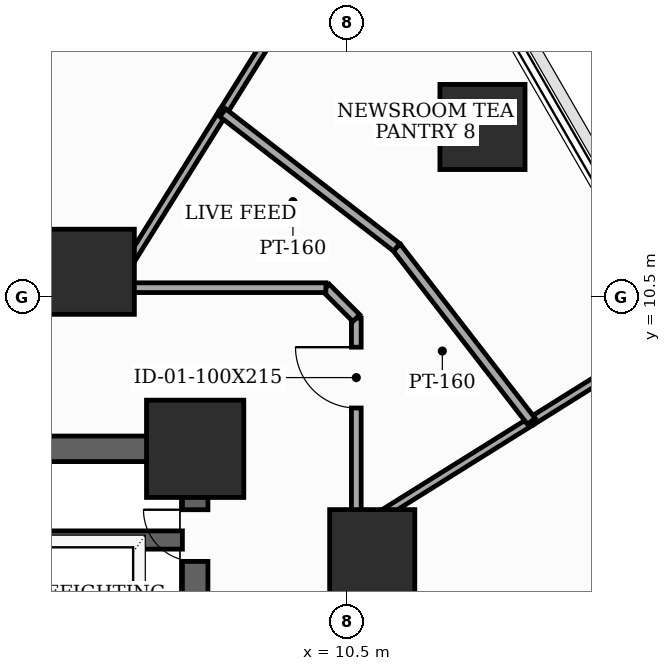
"""IFC4 building model, lengths in metres.
Left out: names, types, materials, properties, quantities, classifications, styles, units other than length and angle.
Written with IfcOpenShell. Run it as: python <this file> out.ifc"""

import sys

from ifc_helpers import new_model, si_unit, direction, frame, frame_2d, origin, origin_2d, place, context, subcontext, project, spatial, rectangle, extrude, element, fill, save


model = new_model("IFC4")
c1 = context("Model", 3, precision=1e-05, world=origin(), true_north=direction((0.0, 1.0)))
c2 = subcontext(c1, "Body", "Model", "MODEL_VIEW")
j1 = project(units=[si_unit("LENGTHUNIT", "METRE"), si_unit("PLANEANGLEUNIT", "RADIAN")], contexts=[c1])
p1 = place(None, origin())
s1 = spatial("IfcSite", under=j1, at=p1, CompositionType="ELEMENT")
p2 = place(p1, origin())
s2 = spatial("IfcBuilding", under=s1, at=p2, CompositionType="ELEMENT")
p3 = place(p2, frame((0.0, 0.0, 33.4)))
s3 = spatial("IfcBuildingStorey", under=s2, at=p3, CompositionType="ELEMENT", Elevation=33.4)
p4 = place(p3, frame((8.0, 8.0, 0.0), z_axis=(0.0, 0.0, 1.0), x_axis=(1.0, 0.0, 0.0)))
e1 = element("IfcColumn", 1, at=p4, inside=s3, PredefinedType="COLUMN", context=c2, shape_type="SweptSolid", body=[
    extrude(rectangle(XDim=1.6, YDim=1.6, at=origin_2d()), origin(), (0.0, 0.0, 1.0), 3.7),
])
for number, where, z_axis, x_axis in (
    (2, (10.912, 6.3, 0.0), (0.0, 0.0, 1.0), (1.0, 0.0, 0.0)),
    (3, (6.3, 10.912, 0.0), (0.0, 0.0, 1.0), (1.0, 0.0, 0.0)),
    (4, (12.725, 13.293, 0.0), (0.0, 0.0, 1.0), (1.0, 0.0, 0.0)),
):
    element("IfcColumn", number, at=place(p3, frame(where, z_axis=z_axis, x_axis=x_axis)), inside=s3, PredefinedType="COLUMN", context=c2, shape_type="SweptSolid", body=[
        extrude(rectangle(XDim=1.4, YDim=1.4, at=origin_2d()), origin(), (0.0, 0.0, 1.0), 3.7),
    ])
p5 = place(p3, frame((8.0, -8.0, 0.0), z_axis=(0.0, 0.0, 1.0), x_axis=(0.0, 1.0, 0.0)))
e5 = element("IfcWall", 5, at=p5, inside=s3, PredefinedType="SHEAR", context=c2, shape_type="SweptSolid", body=[
    extrude(rectangle(XDim=16.0, YDim=0.42, at=frame_2d((8.0, 0.0))), origin(), (0.0, 0.0, 1.0), 3.5),
])
p6 = place(p5, frame((9.6, 0.0, 0.0)))
e6 = element("IfcOpeningElement", 6, at=p6, cuts=e5, PredefinedType="OPENING", context=c2, shape_type="SweptSolid", body=[
    extrude(rectangle(XDim=1.05, YDim=2.15, at=frame_2d((0.525, 1.075))), frame((0.0, 0.22, 0.0), z_axis=(0.0, -1.0, 0.0), x_axis=(1.0, 0.0, 0.0)), (0.0, 0.0, 1.0), 0.44),
])
p7 = place(p5, frame((14.148, 0.0, 0.0)))
e7 = element("IfcOpeningElement", 7, at=p7, cuts=e5, PredefinedType="OPENING", context=c2, shape_type="SweptSolid", body=[
    extrude(rectangle(XDim=0.85, YDim=2.02, at=frame_2d((0.425, 1.01))), frame((0.0, 0.22, 0.0), z_axis=(0.0, -1.0, 0.0), x_axis=(1.0, 0.0, 0.0)), (0.0, 0.0, 1.0), 0.44),
])
p8 = place(p3, frame((-8.0, 8.0, 0.0), z_axis=(0.0, 0.0, 1.0), x_axis=(1.0, 0.0, 0.0)))
e8 = element("IfcWall", 8, at=p8, inside=s3, PredefinedType="SHEAR", context=c2, shape_type="SweptSolid", body=[
    extrude(rectangle(XDim=16.0, YDim=0.42, at=frame_2d((8.0, 0.0))), origin(), (0.0, 0.0, 1.0), 3.5),
])
p9 = place(p8, frame((7.1, 0.0, 0.0)))
e9 = element("IfcOpeningElement", 9, at=p9, cuts=e8, PredefinedType="OPENING", context=c2, shape_type="SweptSolid", body=[
    extrude(rectangle(XDim=1.8, YDim=2.15, at=frame_2d((0.9, 1.075))), frame((0.0, 0.22, 0.0), z_axis=(0.0, -1.0, 0.0), x_axis=(1.0, 0.0, 0.0)), (0.0, 0.0, 1.0), 0.44),
])
p10 = place(p3, frame((4.45, 6.5, 0.0), z_axis=(0.0, 0.0, 1.0), x_axis=(1.0, 0.0, 0.0)))
e10 = element("IfcWall", 10, at=p10, inside=s3, PredefinedType="SHEAR", context=c2, shape_type="SweptSolid", body=[
    extrude(rectangle(XDim=3.34, YDim=0.3, at=frame_2d((1.67, 0.0))), origin(), (0.0, 0.0, 1.0), 3.5),
])
p11 = place(p3, frame((10.65, -1.715, 0.0), z_axis=(0.0, 0.0, 1.0), x_axis=(0.0, 1.0, 0.0)))
e11 = element("IfcWall", 11, at=p11, inside=s3, PredefinedType="PARTITIONING", context=c2, shape_type="SweptSolid", body=[
    extrude(rectangle(XDim=8.37, YDim=0.135, at=frame_2d((4.185, 0.0))), origin(), (0.0, 0.0, 1.0), 2.785),
])
p12 = place(p3, frame((6.655, 10.65, 0.0), z_axis=(0.0, 0.0, 1.0), x_axis=(-1.0, 0.0, 0.0)))
e12 = element("IfcWall", 12, at=p12, inside=s3, PredefinedType="PARTITIONING", context=c2, shape_type="SweptSolid", body=[
    extrude(rectangle(XDim=2.663, YDim=0.135, at=frame_2d((1.332, 0.0))), origin(), (0.0, 0.0, 1.0), 2.685),
])
p13 = place(p3, frame((3.992, 10.65, 0.0), z_axis=(0.0, 0.0, 1.0), x_axis=(0.258889712088, 0.965906888357, 0.0)))
e13 = element("IfcWall", 13, at=p13, inside=s3, PredefinedType="PARTITIONING", context=c2, shape_type="SweptSolid", body=[
    extrude(rectangle(XDim=11.28, YDim=0.135, at=frame_2d((5.64, 0.0))), origin(), (0.0, 0.0, 1.0), 2.785),
])
p14 = place(p3, frame((10.65, 6.655, 0.0), z_axis=(0.0, 0.0, 1.0), x_axis=(0.0, 1.0, 0.0)))
e14 = element("IfcWall", 14, at=p14, inside=s3, PredefinedType="PARTITIONING", context=c2, shape_type="SweptSolid", body=[
    extrude(rectangle(XDim=3.495, YDim=0.16, at=frame_2d((1.748, 0.0))), origin(), (0.0, 0.0, 1.0), 2.785),
])
p15 = place(p14, frame((2.016, 0.0, 0.0)))
e15 = element("IfcOpeningElement", 15, at=p15, cuts=e14, PredefinedType="OPENING", context=c2, shape_type="SweptSolid", body=[
    extrude(rectangle(XDim=1.0, YDim=2.15, at=frame_2d((0.5, 1.075))), frame((0.0, 0.09, 0.0), z_axis=(0.0, -1.0, 0.0), x_axis=(1.0, 0.0, 0.0)), (0.0, 0.0, 1.0), 0.18),
])
p16 = place(p3, frame((10.65, 10.15, 0.0), z_axis=(0.0, 0.0, 1.0), x_axis=(-0.707106781187, 0.707106781187, 0.0)))
e16 = element("IfcWall", 16, at=p16, inside=s3, PredefinedType="PARTITIONING", context=c2, shape_type="SweptSolid", body=[
    extrude(rectangle(XDim=0.707, YDim=0.16, at=frame_2d((0.354, 0.0))), origin(), (0.0, 0.0, 1.0), 3.5),
])
p17 = place(p3, frame((10.15, 10.65, 0.0), z_axis=(0.0, 0.0, 1.0), x_axis=(-1.0, 0.0, 0.0)))
e17 = element("IfcWall", 17, at=p17, inside=s3, PredefinedType="PARTITIONING", context=c2, shape_type="SweptSolid", body=[
    extrude(rectangle(XDim=3.495, YDim=0.16, at=frame_2d((1.748, 0.0))), origin(), (0.0, 0.0, 1.0), 2.785),
])
p18 = place(p3, frame((13.528, 8.453, 0.0), z_axis=(0.0, 0.0, 1.0), x_axis=(-0.848131653937, -0.529785520366, 0.0)))
e18 = element("IfcWall", 18, at=p18, inside=s3, PredefinedType="PARTITIONING", context=c2, shape_type="SweptSolid", body=[
    extrude(rectangle(XDim=3.394, YDim=0.135, at=frame_2d((1.697, 0.0))), origin(), (0.0, 0.0, 1.0), 2.785),
])
p19 = place(p3, frame((15.984, 9.988, 0.0), z_axis=(0.0, 0.0, 1.0), x_axis=(-0.847941475479, -0.5300898548, 0.0)))
e19 = element("IfcWall", 19, at=p19, inside=s3, PredefinedType="PARTITIONING", context=c2, shape_type="SweptSolid", body=[
    extrude(rectangle(XDim=2.896, YDim=0.135, at=frame_2d((1.448, 0.0))), origin(), (0.0, 0.0, 1.0), 2.935),
])
p20 = place(p3, frame((6.655, 10.65, 0.0), z_axis=(0.0, 0.0, 1.0), x_axis=(0.529785520366, 0.848131653937, 0.0)))
e20 = element("IfcWall", 20, at=p20, inside=s3, PredefinedType="PARTITIONING", context=c2, shape_type="SweptSolid", body=[
    extrude(rectangle(XDim=3.394, YDim=0.135, at=frame_2d((1.697, 0.0))), origin(), (0.0, 0.0, 1.0), 2.685),
])
p21 = place(p3, frame((8.453, 13.528, 0.0), z_axis=(0.0, 0.0, 1.0), x_axis=(0.529933702465, 0.848039073977, 0.0)))
e21 = element("IfcWall", 21, at=p21, inside=s3, PredefinedType="PARTITIONING", context=c2, shape_type="SweptSolid", body=[
    extrude(rectangle(XDim=5.382, YDim=0.135, at=frame_2d((2.691, 0.0))), origin(), (0.0, 0.0, 1.0), 2.935),
])
p22 = place(p21, frame((2.231, 0.0, 0.0)))
e22 = element("IfcOpeningElement", 22, at=p22, cuts=e21, PredefinedType="OPENING", context=c2, shape_type="SweptSolid", body=[
    extrude(rectangle(XDim=0.92, YDim=2.1, at=frame_2d((0.46, 1.05))), frame((0.0, 0.077, 0.0), z_axis=(0.0, -1.0, 0.0), x_axis=(1.0, 0.0, 0.0)), (0.0, 0.0, 1.0), 0.155),
])
p23 = place(p3, frame((13.528, 8.453, 0.0), z_axis=(0.0, 0.0, 1.0), x_axis=(-0.612013931987, 0.790846980809, 0.0)))
e23 = element("IfcWall", 23, at=p23, inside=s3, PredefinedType="PARTITIONING", context=c2, shape_type="SweptSolid", body=[
    extrude(rectangle(XDim=3.618, YDim=0.16, at=frame_2d((1.809, 0.0))), origin(), (0.0, 0.0, 1.0), 3.5),
])
p24 = place(p3, frame((11.314, 11.314, 0.0), z_axis=(0.0, 0.0, 1.0), x_axis=(-0.790846980809, 0.612013931987, 0.0)))
e24 = element("IfcWall", 24, at=p24, inside=s3, PredefinedType="PARTITIONING", context=c2, shape_type="SweptSolid", body=[
    extrude(rectangle(XDim=3.618, YDim=0.16, at=frame_2d((1.809, 0.0))), origin(), (0.0, 0.0, 1.0), 2.685),
])
p25 = place(p7, origin())
e25 = element("IfcDoor", 25, at=p25, inside=s3, OperationType="SINGLE_SWING_RIGHT", PredefinedType="TRAPDOOR", context=c2, shape_type="SweptSolid", body=[
    extrude(rectangle(XDim=0.85, YDim=2.02, at=frame_2d((0.425, 1.01))), frame((0.0, 0.025, 0.0), z_axis=(0.0, -1.0, 0.0), x_axis=(1.0, 0.0, 0.0)), (0.0, 0.0, 1.0), 0.05),
])
fill(e7, e25)
p26 = place(p15, origin())
e26 = element("IfcDoor", 26, at=p26, inside=s3, OperationType="SINGLE_SWING_RIGHT", PredefinedType="DOOR", context=c2, shape_type="SweptSolid", body=[
    extrude(rectangle(XDim=1.0, YDim=2.15, at=frame_2d((0.5, 1.075))), frame((0.0, 0.025, 0.0), z_axis=(0.0, -1.0, 0.0), x_axis=(1.0, 0.0, 0.0)), (0.0, 0.0, 1.0), 0.05),
])
fill(e15, e26)
save(model, sys.argv[1])
